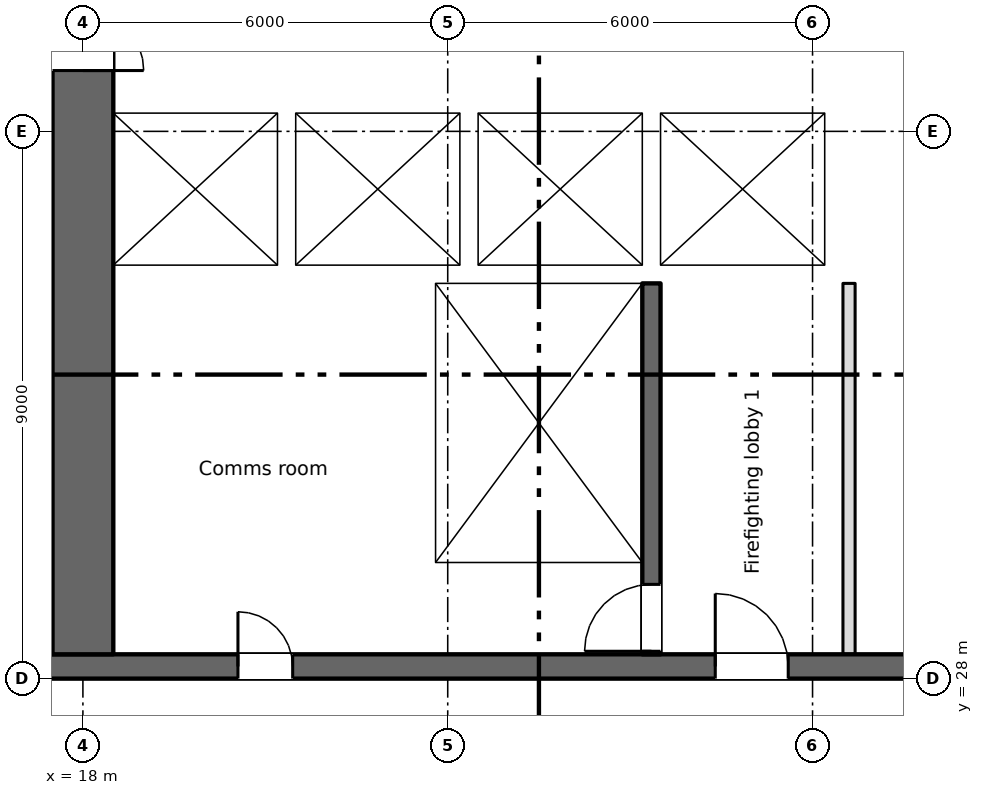
"""IFC4 building model, lengths in metres.
Left out: names, types, materials, properties, quantities, classifications, styles, units other than length and angle.
Written with IfcOpenShell. Run it as: python <this file> out.ifc"""

import sys

from ifc_helpers import new_model, si_unit, direction, frame, frame_2d, origin, place, context, subcontext, project, spatial, rectangle, extrude, element, fill, save


model = new_model("IFC4")
c1 = context("Model", 3, precision=1e-05, world=origin(), true_north=direction((0.0, 1.0)))
c2 = subcontext(c1, "Body", "Model", "MODEL_VIEW")
j1 = project(units=[si_unit("LENGTHUNIT", "METRE"), si_unit("PLANEANGLEUNIT", "RADIAN")], contexts=[c1])
p1 = place(None, origin())
s1 = spatial("IfcSite", under=j1, at=p1, CompositionType="ELEMENT")
p2 = place(p1, origin())
s2 = spatial("IfcBuilding", under=s1, at=p2, CompositionType="ELEMENT")
p3 = place(p2, frame((0.0, 0.0, 60.0)))
s3 = spatial("IfcBuildingStorey", under=s2, at=p3, CompositionType="ELEMENT", Elevation=60.0)
p4 = place(p3, frame((6.7, 28.2, 0.0), z_axis=(0.0, 0.0, 1.0), x_axis=(1.0, 0.0, 0.0)))
e1 = element("IfcWall", 1, at=p4, inside=s3, PredefinedType="SHEAR", context=c2, shape_type="SweptSolid", body=[
    extrude(rectangle(XDim=57.8, YDim=0.4, at=frame_2d((28.9, 0.0))), origin(), (0.0, 0.0, 1.0), 3.35),
])
p5 = place(p4, frame((13.85, 0.0, 0.0)))
e2 = element("IfcOpeningElement", 2, at=p5, cuts=e1, PredefinedType="OPENING", context=c2, shape_type="SweptSolid", body=[
    extrude(rectangle(XDim=0.9, YDim=2.1, at=frame_2d((0.45, 1.05))), frame((0.0, 0.21, 0.0), z_axis=(0.0, -1.0, 0.0), x_axis=(1.0, 0.0, 0.0)), (0.0, 0.0, 1.0), 0.42),
])
p6 = place(p4, frame((48.562, 0.0, 0.0)))
e3 = element("IfcOpeningElement", 3, at=p6, cuts=e1, PredefinedType="OPENING", context=c2, shape_type="SweptSolid", body=[
    extrude(rectangle(XDim=0.9, YDim=2.1, at=frame_2d((0.45, 1.05))), frame((0.0, 0.21, 0.0), z_axis=(0.0, -1.0, 0.0), x_axis=(1.0, 0.0, 0.0)), (0.0, 0.0, 1.0), 0.42),
])
p7 = place(p4, frame((51.137, 0.0, 0.0)))
e4 = element("IfcOpeningElement", 4, at=p7, cuts=e1, PredefinedType="OPENING", context=c2, shape_type="SweptSolid", body=[
    extrude(rectangle(XDim=0.9, YDim=2.1, at=frame_2d((0.45, 1.05))), frame((0.0, 0.21, 0.0), z_axis=(0.0, -1.0, 0.0), x_axis=(1.0, 0.0, 0.0)), (0.0, 0.0, 1.0), 0.42),
])
p8 = place(p4, frame((1.35, 0.0, 0.0)))
e5 = element("IfcOpeningElement", 5, at=p8, cuts=e1, PredefinedType="OPENING", context=c2, shape_type="SweptSolid", body=[
    extrude(rectangle(XDim=0.9, YDim=2.1, at=frame_2d((0.45, 1.05))), frame((0.0, 0.21, 0.0), z_axis=(0.0, -1.0, 0.0), x_axis=(1.0, 0.0, 0.0)), (0.0, 0.0, 1.0), 0.42),
])
p9 = place(p4, frame((4.7, 0.0, 0.0)))
e6 = element("IfcOpeningElement", 6, at=p9, cuts=e1, PredefinedType="OPENING", context=c2, shape_type="SweptSolid", body=[
    extrude(rectangle(XDim=1.2, YDim=2.1, at=frame_2d((0.6, 1.05))), frame((0.0, 0.21, 0.0), z_axis=(0.0, -1.0, 0.0), x_axis=(1.0, 0.0, 0.0)), (0.0, 0.0, 1.0), 0.42),
])
p10 = place(p4, frame((31.7, 0.0, 0.0)))
e7 = element("IfcOpeningElement", 7, at=p10, cuts=e1, PredefinedType="OPENING", context=c2, shape_type="SweptSolid", body=[
    extrude(rectangle(XDim=1.2, YDim=2.1, at=frame_2d((0.6, 1.05))), frame((0.0, 0.21, 0.0), z_axis=(0.0, -1.0, 0.0), x_axis=(1.0, 0.0, 0.0)), (0.0, 0.0, 1.0), 0.42),
])
p11 = place(p4, frame((55.2, 0.0, 0.0)))
e8 = element("IfcOpeningElement", 8, at=p11, cuts=e1, PredefinedType="OPENING", context=c2, shape_type="SweptSolid", body=[
    extrude(rectangle(XDim=1.2, YDim=2.1, at=frame_2d((0.6, 1.05))), frame((0.0, 0.21, 0.0), z_axis=(0.0, -1.0, 0.0), x_axis=(1.0, 0.0, 0.0)), (0.0, 0.0, 1.0), 0.42),
])
p12 = place(p4, frame((21.7, 0.0, 0.0)))
e9 = element("IfcOpeningElement", 9, at=p12, cuts=e1, PredefinedType="OPENING", context=c2, shape_type="SweptSolid", body=[
    extrude(rectangle(XDim=1.2, YDim=2.1, at=frame_2d((0.6, 1.05))), frame((0.0, 0.21, 0.0), z_axis=(0.0, -1.0, 0.0), x_axis=(1.0, 0.0, 0.0)), (0.0, 0.0, 1.0), 0.42),
])
p13 = place(p4, frame((41.7, 0.0, 0.0)))
e10 = element("IfcOpeningElement", 10, at=p13, cuts=e1, PredefinedType="OPENING", context=c2, shape_type="SweptSolid", body=[
    extrude(rectangle(XDim=1.2, YDim=2.1, at=frame_2d((0.6, 1.05))), frame((0.0, 0.21, 0.0), z_axis=(0.0, -1.0, 0.0), x_axis=(1.0, 0.0, 0.0)), (0.0, 0.0, 1.0), 0.42),
])
p14 = place(p4, frame((24.85, 0.0, 0.0)))
e11 = element("IfcOpeningElement", 11, at=p14, cuts=e1, PredefinedType="OPENING", context=c2, shape_type="SweptSolid", body=[
    extrude(rectangle(XDim=2.4, YDim=2.1, at=frame_2d((1.2, 1.05))), frame((0.0, 0.21, 0.0), z_axis=(0.0, -1.0, 0.0), x_axis=(1.0, 0.0, 0.0)), (0.0, 0.0, 1.0), 0.42),
])
p15 = place(p4, frame((37.35, 0.0, 0.0)))
e12 = element("IfcOpeningElement", 12, at=p15, cuts=e1, PredefinedType="OPENING", context=c2, shape_type="SweptSolid", body=[
    extrude(rectangle(XDim=2.4, YDim=2.1, at=frame_2d((1.2, 1.05))), frame((0.0, 0.21, 0.0), z_axis=(0.0, -1.0, 0.0), x_axis=(1.0, 0.0, 0.0)), (0.0, 0.0, 1.0), 0.42),
])
p16 = place(p4, frame((7.85, 0.0, 0.0)))
e13 = element("IfcOpeningElement", 13, at=p16, cuts=e1, PredefinedType="OPENING", context=c2, shape_type="SweptSolid", body=[
    extrude(rectangle(XDim=2.4, YDim=2.1, at=frame_2d((1.2, 1.05))), frame((0.0, 0.21, 0.0), z_axis=(0.0, -1.0, 0.0), x_axis=(1.0, 0.0, 0.0)), (0.0, 0.0, 1.0), 0.42),
])
p17 = place(p4, frame((28.85, 0.0, 0.0)))
e14 = element("IfcOpeningElement", 14, at=p17, cuts=e1, PredefinedType="OPENING", context=c2, shape_type="SweptSolid", body=[
    extrude(rectangle(XDim=0.9, YDim=2.1, at=frame_2d((0.45, 1.05))), frame((0.0, 0.21, 0.0), z_axis=(0.0, -1.0, 0.0), x_axis=(1.0, 0.0, 0.0)), (0.0, 0.0, 1.0), 0.42),
])
p18 = place(p4, frame((34.85, 0.0, 0.0)))
e15 = element("IfcOpeningElement", 15, at=p18, cuts=e1, PredefinedType="OPENING", context=c2, shape_type="SweptSolid", body=[
    extrude(rectangle(XDim=0.9, YDim=2.1, at=frame_2d((0.45, 1.05))), frame((0.0, 0.21, 0.0), z_axis=(0.0, -1.0, 0.0), x_axis=(1.0, 0.0, 0.0)), (0.0, 0.0, 1.0), 0.42),
])
p19 = place(p3, frame((18.0, 28.4, 0.0), z_axis=(0.0, 0.0, 1.0), x_axis=(0.0, 1.0, 0.0)))
e16 = element("IfcWall", 16, at=p19, inside=s3, PredefinedType="SHEAR", context=c2, shape_type="SweptSolid", body=[
    extrude(rectangle(XDim=16.6, YDim=1.0, at=frame_2d((8.3, 0.0))), origin(), (0.0, 0.0, 1.0), 3.35),
])
p20 = place(p19, frame((9.6, 0.0, 0.0)))
e17 = element("IfcOpeningElement", 17, at=p20, cuts=e16, PredefinedType="OPENING", context=c2, shape_type="SweptSolid", body=[
    extrude(rectangle(XDim=2.0, YDim=2.1, at=frame_2d((1.0, 1.05))), frame((0.0, 0.51, 0.0), z_axis=(0.0, -1.0, 0.0), x_axis=(1.0, 0.0, 0.0)), (0.0, 0.0, 1.0), 1.02),
])
p21 = place(p19, frame((15.25, 0.0, 0.0)))
e18 = element("IfcOpeningElement", 18, at=p21, cuts=e16, PredefinedType="OPENING", context=c2, shape_type="SweptSolid", body=[
    extrude(rectangle(XDim=1.2, YDim=2.1, at=frame_2d((0.6, 1.05))), frame((0.0, 0.51, 0.0), z_axis=(0.0, -1.0, 0.0), x_axis=(1.0, 0.0, 0.0)), (0.0, 0.0, 1.0), 1.02),
])
p22 = place(p3, frame((23.65, 28.4, 0.0), z_axis=(0.0, 0.0, 1.0), x_axis=(0.0, 1.0, 0.0)))
e19 = element("IfcWall", 19, at=p22, inside=s3, PredefinedType="SHEAR", context=c2, shape_type="SweptSolid", body=[
    extrude(rectangle(XDim=6.1, YDim=0.3, at=frame_2d((3.05, 0.0))), origin(), (0.0, 0.0, 1.0), 3.35),
])
p23 = place(p3, frame((27.35, 28.4, 0.0), z_axis=(0.0, 0.0, 1.0), x_axis=(0.0, 1.0, 0.0)))
e20 = element("IfcWall", 20, at=p23, inside=s3, PredefinedType="SHEAR", context=c2, shape_type="SweptSolid", body=[
    extrude(rectangle(XDim=6.1, YDim=0.3, at=frame_2d((3.05, 0.0))), origin(), (0.0, 0.0, 1.0), 3.35),
])
p24 = place(p23, frame((0.05, 0.0, 0.0)))
e21 = element("IfcOpeningElement", 21, at=p24, cuts=e20, PredefinedType="OPENING", context=c2, shape_type="SweptSolid", body=[
    extrude(rectangle(XDim=1.1, YDim=2.1, at=frame_2d((0.55, 1.05))), frame((0.0, 0.16, 0.0), z_axis=(0.0, -1.0, 0.0), x_axis=(1.0, 0.0, 0.0)), (0.0, 0.0, 1.0), 0.32),
])
p25 = place(p3, frame((18.5, 34.65, 0.0), z_axis=(0.0, 0.0, 1.0), x_axis=(1.0, 0.0, 0.0)))
e22 = element("IfcWall", 22, at=p25, inside=s3, PredefinedType="SHEAR", context=c2, shape_type="SweptSolid", body=[
    extrude(rectangle(XDim=12.2, YDim=0.3, at=frame_2d((6.1, 0.0))), origin(), (0.0, 0.0, 1.0), 3.35),
])
p26 = place(p25, frame((9.8, 0.0, 0.0)))
e23 = element("IfcOpeningElement", 23, at=p26, cuts=e22, PredefinedType="OPENING", context=c2, shape_type="SweptSolid", body=[
    extrude(rectangle(XDim=1.1, YDim=2.1, at=frame_2d((0.55, 1.05))), frame((0.0, 0.16, 0.0), z_axis=(0.0, -1.0, 0.0), x_axis=(1.0, 0.0, 0.0)), (0.0, 0.0, 1.0), 0.32),
])
p27 = place(p3, frame((18.5, 37.45, 0.0), z_axis=(0.0, 0.0, 1.0), x_axis=(1.0, 0.0, 0.0)))
e24 = element("IfcWall", 24, at=p27, inside=s3, PredefinedType="SHEAR", context=c2, shape_type="SweptSolid", body=[
    extrude(rectangle(XDim=12.2, YDim=0.3, at=frame_2d((6.1, 0.0))), origin(), (0.0, 0.0, 1.0), 3.35),
])
p28 = place(p27, frame((0.8, 0.0, 0.0)))
e25 = element("IfcOpeningElement", 25, at=p28, cuts=e24, PredefinedType="OPENING", context=c2, shape_type="SweptSolid", body=[
    extrude(rectangle(XDim=1.1, YDim=2.1, at=frame_2d((0.55, 1.05))), frame((0.0, 0.16, 0.0), z_axis=(0.0, -1.0, 0.0), x_axis=(1.0, 0.0, 0.0)), (0.0, 0.0, 1.0), 0.32),
])
p29 = place(p27, frame((3.8, 0.0, 0.0)))
e26 = element("IfcOpeningElement", 26, at=p29, cuts=e24, PredefinedType="OPENING", context=c2, shape_type="SweptSolid", body=[
    extrude(rectangle(XDim=1.1, YDim=2.1, at=frame_2d((0.55, 1.05))), frame((0.0, 0.16, 0.0), z_axis=(0.0, -1.0, 0.0), x_axis=(1.0, 0.0, 0.0)), (0.0, 0.0, 1.0), 0.32),
])
p30 = place(p27, frame((6.8, 0.0, 0.0)))
e27 = element("IfcOpeningElement", 27, at=p30, cuts=e24, PredefinedType="OPENING", context=c2, shape_type="SweptSolid", body=[
    extrude(rectangle(XDim=1.1, YDim=2.1, at=frame_2d((0.55, 1.05))), frame((0.0, 0.16, 0.0), z_axis=(0.0, -1.0, 0.0), x_axis=(1.0, 0.0, 0.0)), (0.0, 0.0, 1.0), 0.32),
])
p31 = place(p3, frame((27.35, 34.8, 0.0), z_axis=(0.0, 0.0, 1.0), x_axis=(0.0, 1.0, 0.0)))
e28 = element("IfcWall", 28, at=p31, inside=s3, PredefinedType="SHEAR", context=c2, shape_type="SweptSolid", body=[
    extrude(rectangle(XDim=2.5, YDim=0.3, at=frame_2d((1.25, 0.0))), origin(), (0.0, 0.0, 1.0), 3.35),
])
p32 = place(p3, frame((30.45, 34.8, 0.0), z_axis=(0.0, 0.0, 1.0), x_axis=(0.0, 1.0, 0.0)))
e29 = element("IfcWall", 29, at=p32, inside=s3, PredefinedType="SHEAR", context=c2, shape_type="SweptSolid", body=[
    extrude(rectangle(XDim=2.5, YDim=0.5, at=frame_2d((1.25, 0.0))), origin(), (0.0, 0.0, 1.0), 3.35),
])
for number, where, z_axis, x_axis in (
    (30, (21.35, 34.8, 0.0), (0.0, 0.0, 1.0), (0.0, 1.0, 0.0)),
    (31, (24.35, 34.8, 0.0), (0.0, 0.0, 1.0), (0.0, 1.0, 0.0)),
):
    element("IfcWall", number, at=place(p3, frame(where, z_axis=z_axis, x_axis=x_axis)), inside=s3, PredefinedType="SHEAR", context=c2, shape_type="SweptSolid", body=[
        extrude(rectangle(XDim=2.5, YDim=0.3, at=frame_2d((1.25, 0.0))), origin(), (0.0, 0.0, 1.0), 3.35),
    ])
p33 = place(p3, frame((30.6, 28.4, 0.0), z_axis=(0.0, 0.0, 1.0), x_axis=(0.0, 1.0, 0.0)))
e32 = element("IfcWall", 32, at=p33, inside=s3, PredefinedType="PARTITIONING", context=c2, shape_type="SweptSolid", body=[
    extrude(rectangle(XDim=6.1, YDim=0.2, at=frame_2d((3.05, 0.0))), origin(), (0.0, 0.0, 1.0), 3.35),
])
p34 = place(p5, origin())
e33 = element("IfcDoor", 33, at=p34, inside=s3, OperationType="SINGLE_SWING_LEFT", PredefinedType="DOOR", context=c2, shape_type="SweptSolid", body=[
    extrude(rectangle(XDim=0.9, YDim=2.1, at=frame_2d((0.45, 1.05))), frame((0.0, 0.025, 0.0), z_axis=(0.0, -1.0, 0.0), x_axis=(1.0, 0.0, 0.0)), (0.0, 0.0, 1.0), 0.05),
])
fill(e2, e33)
p35 = place(p28, origin())
e34 = element("IfcDoor", 34, at=p35, inside=s3, OperationType="SLIDING_TO_LEFT", PredefinedType="DOOR", context=c2, shape_type="SweptSolid", body=[
    extrude(rectangle(XDim=1.1, YDim=2.1, at=frame_2d((0.55, 1.05))), frame((0.0, 0.025, 0.0), z_axis=(0.0, -1.0, 0.0), x_axis=(1.0, 0.0, 0.0)), (0.0, 0.0, 1.0), 0.05),
])
fill(e25, e34)
p36 = place(p29, origin())
e35 = element("IfcDoor", 35, at=p36, inside=s3, OperationType="SLIDING_TO_LEFT", PredefinedType="DOOR", context=c2, shape_type="SweptSolid", body=[
    extrude(rectangle(XDim=1.1, YDim=2.1, at=frame_2d((0.55, 1.05))), frame((0.0, 0.025, 0.0), z_axis=(0.0, -1.0, 0.0), x_axis=(1.0, 0.0, 0.0)), (0.0, 0.0, 1.0), 0.05),
])
fill(e26, e35)
p37 = place(p30, origin())
e36 = element("IfcDoor", 36, at=p37, inside=s3, OperationType="SLIDING_TO_LEFT", PredefinedType="DOOR", context=c2, shape_type="SweptSolid", body=[
    extrude(rectangle(XDim=1.1, YDim=2.1, at=frame_2d((0.55, 1.05))), frame((0.0, 0.025, 0.0), z_axis=(0.0, -1.0, 0.0), x_axis=(1.0, 0.0, 0.0)), (0.0, 0.0, 1.0), 0.05),
])
fill(e27, e36)
p38 = place(p26, origin())
e37 = element("IfcDoor", 37, at=p38, inside=s3, OperationType="SLIDING_TO_LEFT", PredefinedType="DOOR", context=c2, shape_type="SweptSolid", body=[
    extrude(rectangle(XDim=1.1, YDim=2.1, at=frame_2d((0.55, 1.05))), frame((0.0, 0.025, 0.0), z_axis=(0.0, -1.0, 0.0), x_axis=(1.0, 0.0, 0.0)), (0.0, 0.0, 1.0), 0.05),
])
fill(e23, e37)
p39 = place(p24, origin())
e38 = element("IfcDoor", 38, at=p39, inside=s3, OperationType="SINGLE_SWING_LEFT", PredefinedType="DOOR", context=c2, shape_type="SweptSolid", body=[
    extrude(rectangle(XDim=1.1, YDim=2.1, at=frame_2d((0.55, 1.05))), frame((0.0, 0.025, 0.0), z_axis=(0.0, -1.0, 0.0), x_axis=(1.0, 0.0, 0.0)), (0.0, 0.0, 1.0), 0.05),
])
fill(e21, e38)
p40 = place(p12, origin())
e39 = element("IfcDoor", 39, at=p40, inside=s3, OperationType="SINGLE_SWING_LEFT", PredefinedType="DOOR", context=c2, shape_type="SweptSolid", body=[
    extrude(rectangle(XDim=1.2, YDim=2.1, at=frame_2d((0.6, 1.05))), frame((0.0, 0.025, 0.0), z_axis=(0.0, -1.0, 0.0), x_axis=(1.0, 0.0, 0.0)), (0.0, 0.0, 1.0), 0.05),
])
fill(e9, e39)
p41 = place(p20, origin())
e40 = element("IfcDoor", 40, at=p41, inside=s3, OperationType="DOUBLE_DOOR_SINGLE_SWING", PredefinedType="DOOR", context=c2, shape_type="SweptSolid", body=[
    extrude(rectangle(XDim=2.0, YDim=2.1, at=frame_2d((1.0, 1.05))), frame((0.0, 0.025, 0.0), z_axis=(0.0, -1.0, 0.0), x_axis=(1.0, 0.0, 0.0)), (0.0, 0.0, 1.0), 0.05),
])
fill(e17, e40)
save(model, sys.argv[1])
